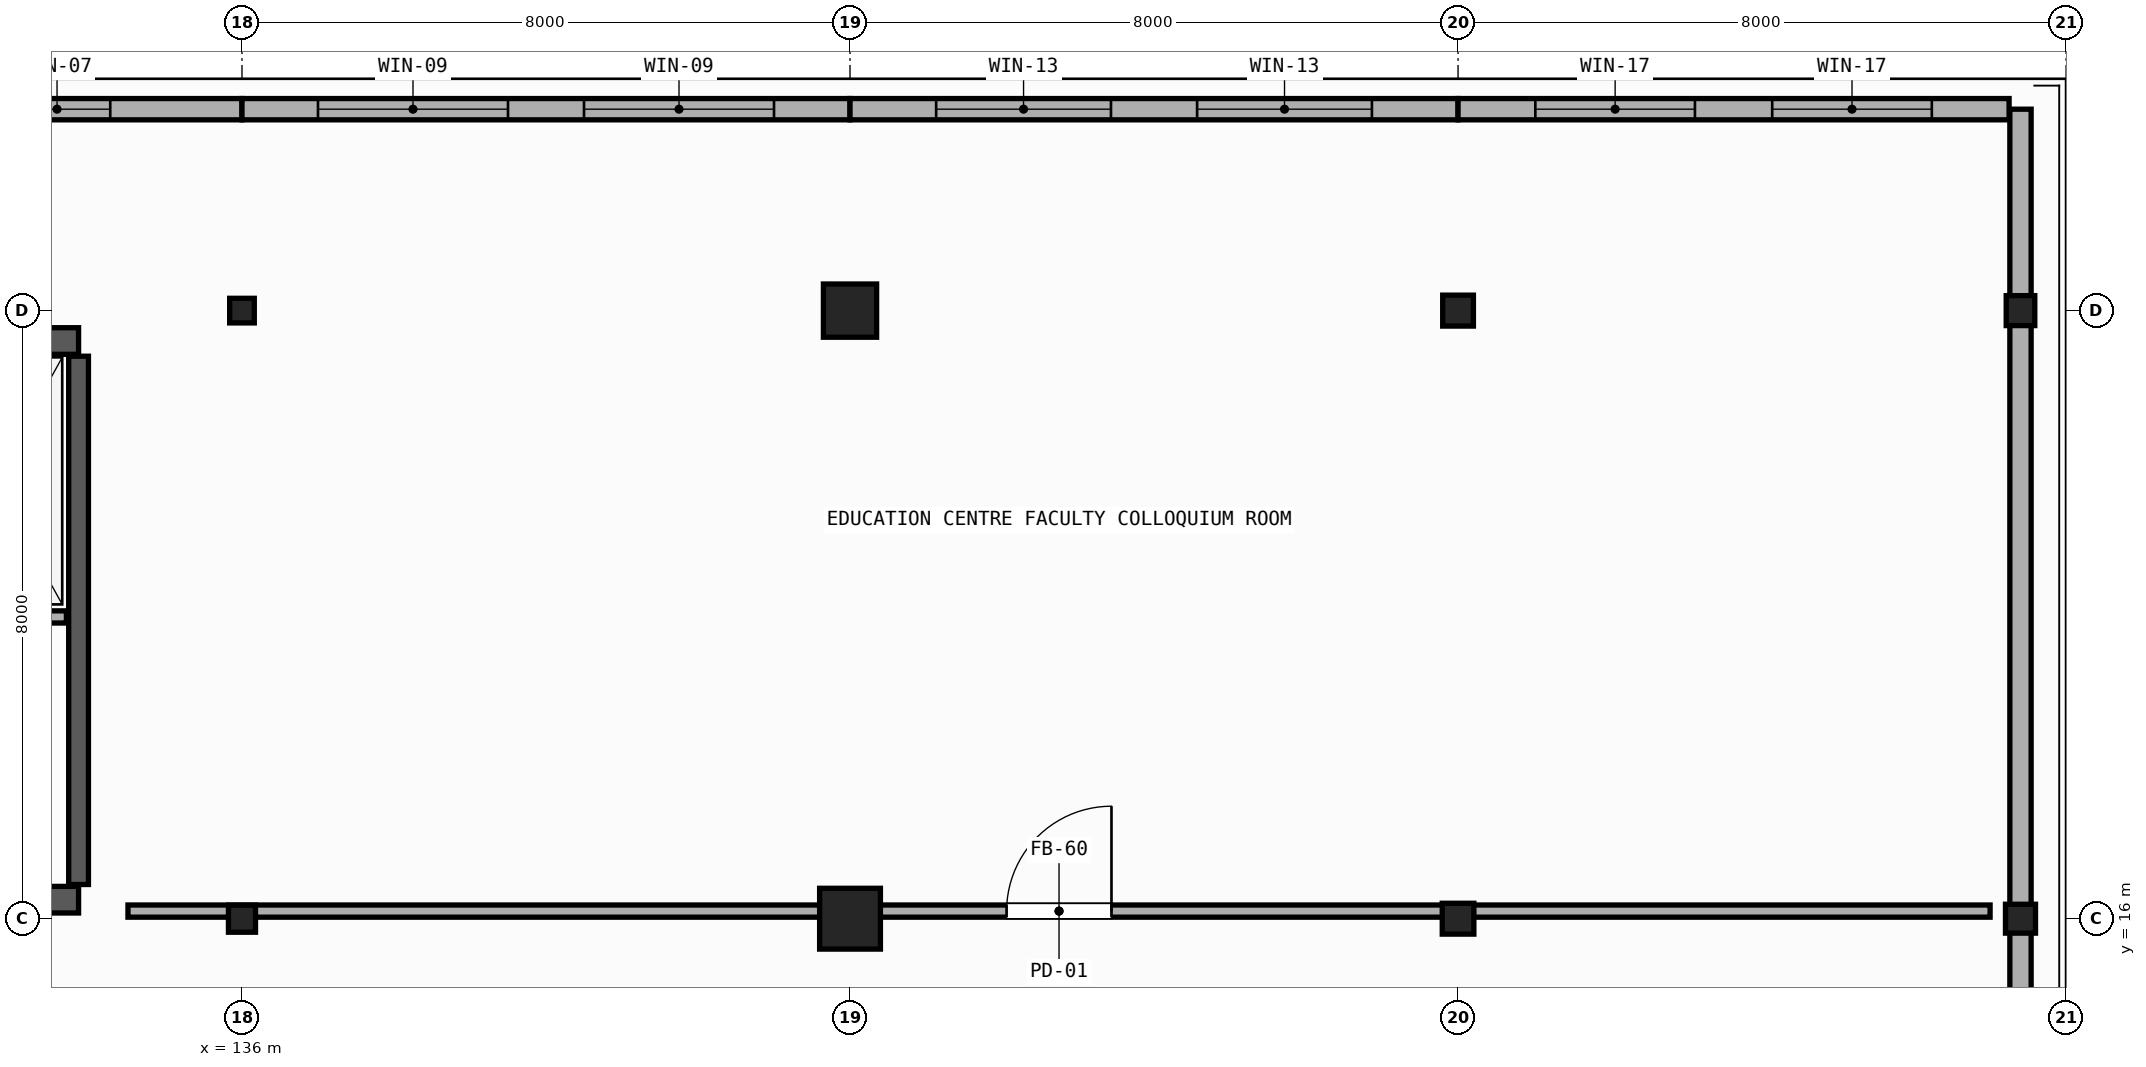
"""IFC4 building model, lengths in metres.
Left out: names, types, materials, properties, quantities, classifications, styles, units other than length and angle.
Written with IfcOpenShell. Run it as: python <this file> out.ifc"""

import sys

from ifc_helpers import new_model, si_unit, direction, frame, frame_2d, origin, origin_2d, place, context, subcontext, project, spatial, rectangle, hollow_circle, i_section, extrude, element, fill, save


model = new_model("IFC4")
c1 = context("Model", 3, precision=1e-05, world=origin(), true_north=direction((0.0, 1.0)))
c2 = subcontext(c1, "Body", "Model", "MODEL_VIEW")
j1 = project(units=[si_unit("LENGTHUNIT", "METRE"), si_unit("PLANEANGLEUNIT", "RADIAN")], contexts=[c1])
p1 = place(None, origin())
s1 = spatial("IfcSite", under=j1, at=p1, CompositionType="ELEMENT")
p2 = place(p1, origin())
s2 = spatial("IfcBuilding", under=s1, at=p2, CompositionType="ELEMENT")
p3 = place(p2, frame((0.0, 0.0, 10.2)))
s3 = spatial("IfcBuildingStorey", under=s2, at=p3, CompositionType="ELEMENT", Elevation=10.2)
p4 = place(p3, frame((136.0, 16.0, 0.0), z_axis=(0.0, 0.0, 1.0), x_axis=(0.0, 1.0, 0.0)))
e1 = element("IfcColumn", 1, at=p4, inside=s3, PredefinedType="COLUMN", context=c2, shape_type="SweptSolid", body=[
    extrude(hollow_circle(Radius=0.178, WallThickness=0.012, at=origin_2d()), origin(), (0.0, 0.0, 1.0), 4.58),
])
p5 = place(p3, frame((136.0, 24.0, 0.0), z_axis=(0.0, 0.0, 1.0), x_axis=(1.0, 0.0, 0.0)))
e2 = element("IfcColumn", 2, at=p5, inside=s3, PredefinedType="COLUMN", context=c2, shape_type="SweptSolid", body=[
    extrude(hollow_circle(Radius=0.162, WallThickness=0.012, at=origin_2d()), origin(), (0.0, 0.0, 1.0), 4.58),
])
p6 = place(p3, frame((144.0, 16.0, 0.0), z_axis=(0.0, 0.0, 1.0), x_axis=(1.0, 0.0, 0.0)))
e3 = element("IfcColumn", 3, at=p6, inside=s3, PredefinedType="COLUMN", context=c2, shape_type="SweptSolid", body=[
    extrude(rectangle(XDim=0.8, YDim=0.8, at=origin_2d()), origin(), (0.0, 0.0, 1.0), 4.58),
])
p7 = place(p3, frame((144.0, 24.0, 0.0), z_axis=(0.0, 0.0, 1.0), x_axis=(0.0, 1.0, 0.0)))
e4 = element("IfcColumn", 4, at=p7, inside=s3, PredefinedType="COLUMN", context=c2, shape_type="SweptSolid", body=[
    extrude(rectangle(XDim=0.7, YDim=0.7, at=origin_2d()), origin(), (0.0, 0.0, 1.0), 4.58),
])
p8 = place(p3, frame((152.0, 16.0, 0.0), z_axis=(0.0, 0.0, 1.0), x_axis=(0.0, 1.0, 0.0)))
e5 = element("IfcColumn", 5, at=p8, inside=s3, PredefinedType="COLUMN", context=c2, shape_type="SweptSolid", body=[
    extrude(i_section(OverallWidth=0.406, OverallDepth=0.416, WebThickness=0.03, FlangeThickness=0.048, FilletRadius=0.015, at=origin_2d()), origin(), (0.0, 0.0, 1.0), 4.58),
])
p9 = place(p3, frame((152.0, 24.0, 0.0), z_axis=(0.0, 0.0, 1.0), x_axis=(1.0, 0.0, 0.0)))
e6 = element("IfcColumn", 6, at=p9, inside=s3, PredefinedType="COLUMN", context=c2, shape_type="SweptSolid", body=[
    extrude(i_section(OverallWidth=0.404, OverallDepth=0.407, WebThickness=0.027, FlangeThickness=0.044, FilletRadius=0.015, at=origin_2d()), origin(), (0.0, 0.0, 1.0), 4.58),
])
p10 = place(p3, frame((159.4, 16.0, 0.0), z_axis=(0.0, 0.0, 1.0), x_axis=(1.0, 0.0, 0.0)))
e7 = element("IfcColumn", 7, at=p10, inside=s3, PredefinedType="COLUMN", context=c2, shape_type="SweptSolid", body=[
    extrude(i_section(OverallWidth=0.395, OverallDepth=0.38, WebThickness=0.019, FlangeThickness=0.03, FilletRadius=0.015, at=origin_2d()), origin(), (0.0, 0.0, 1.0), 4.58),
])
p11 = place(p3, frame((159.4, 24.0, 0.0), z_axis=(0.0, 0.0, 1.0), x_axis=(0.0, 1.0, 0.0)))
e8 = element("IfcColumn", 8, at=p11, inside=s3, PredefinedType="COLUMN", context=c2, shape_type="SweptSolid", body=[
    extrude(i_section(OverallWidth=0.394, OverallDepth=0.376, WebThickness=0.017, FlangeThickness=0.028, FilletRadius=0.015, at=origin_2d()), origin(), (0.0, 0.0, 1.0), 4.58),
])
p12 = place(p3, frame((128.0, 26.65, 0.0), z_axis=(0.0, 0.0, 1.0), x_axis=(1.0, 0.0, 0.0)))
e9 = element("IfcWall", 9, at=p12, inside=s3, PredefinedType="STANDARD", context=c2, shape_type="SweptSolid", body=[
    extrude(rectangle(XDim=8.0, YDim=0.28, at=frame_2d((4.0, 0.0))), origin(), (0.0, 0.0, 1.0), 4.4),
])
p13 = place(p12, frame((1.733, 0.0, 0.95)))
e10 = element("IfcOpeningElement", 10, at=p13, cuts=e9, PredefinedType="OPENING", context=c2, shape_type="SweptSolid", body=[
    extrude(rectangle(XDim=1.4, YDim=2.1, at=frame_2d((0.7, 1.05))), frame((0.0, 0.15, 0.0), z_axis=(0.0, -1.0, 0.0), x_axis=(1.0, 0.0, 0.0)), (0.0, 0.0, 1.0), 0.3),
])
p14 = place(p12, frame((4.867, 0.0, 0.95)))
e11 = element("IfcOpeningElement", 11, at=p14, cuts=e9, PredefinedType="OPENING", context=c2, shape_type="SweptSolid", body=[
    extrude(rectangle(XDim=1.4, YDim=2.1, at=frame_2d((0.7, 1.05))), frame((0.0, 0.15, 0.0), z_axis=(0.0, -1.0, 0.0), x_axis=(1.0, 0.0, 0.0)), (0.0, 0.0, 1.0), 0.3),
])
p15 = place(p3, frame((136.0, 26.65, 0.0), z_axis=(0.0, 0.0, 1.0), x_axis=(1.0, 0.0, 0.0)))
e12 = element("IfcWall", 12, at=p15, inside=s3, PredefinedType="STANDARD", context=c2, shape_type="SweptSolid", body=[
    extrude(rectangle(XDim=8.0, YDim=0.28, at=frame_2d((4.0, 0.0))), origin(), (0.0, 0.0, 1.0), 4.4),
])
p16 = place(p15, frame((1.0, 0.0, 1.0)))
e13 = element("IfcOpeningElement", 13, at=p16, cuts=e12, PredefinedType="OPENING", context=c2, shape_type="SweptSolid", body=[
    extrude(rectangle(XDim=2.5, YDim=2.1, at=frame_2d((1.25, 1.05))), frame((0.0, 0.15, 0.0), z_axis=(0.0, -1.0, 0.0), x_axis=(1.0, 0.0, 0.0)), (0.0, 0.0, 1.0), 0.3),
])
p17 = place(p15, frame((4.5, 0.0, 1.0)))
e14 = element("IfcOpeningElement", 14, at=p17, cuts=e12, PredefinedType="OPENING", context=c2, shape_type="SweptSolid", body=[
    extrude(rectangle(XDim=2.5, YDim=2.1, at=frame_2d((1.25, 1.05))), frame((0.0, 0.15, 0.0), z_axis=(0.0, -1.0, 0.0), x_axis=(1.0, 0.0, 0.0)), (0.0, 0.0, 1.0), 0.3),
])
p18 = place(p3, frame((144.0, 26.65, 0.0), z_axis=(0.0, 0.0, 1.0), x_axis=(1.0, 0.0, 0.0)))
e15 = element("IfcWall", 15, at=p18, inside=s3, PredefinedType="STANDARD", context=c2, shape_type="SweptSolid", body=[
    extrude(rectangle(XDim=8.0, YDim=0.28, at=frame_2d((4.0, 0.0))), origin(), (0.0, 0.0, 1.0), 4.4),
])
p19 = place(p18, frame((1.133, 0.0, 2.25)))
e16 = element("IfcOpeningElement", 16, at=p19, cuts=e15, PredefinedType="OPENING", context=c2, shape_type="SweptSolid", body=[
    extrude(rectangle(XDim=2.3, YDim=1.2, at=frame_2d((1.15, 0.6))), frame((0.0, 0.15, 0.0), z_axis=(0.0, -1.0, 0.0), x_axis=(1.0, 0.0, 0.0)), (0.0, 0.0, 1.0), 0.3),
])
p20 = place(p18, frame((4.567, 0.0, 2.25)))
e17 = element("IfcOpeningElement", 17, at=p20, cuts=e15, PredefinedType="OPENING", context=c2, shape_type="SweptSolid", body=[
    extrude(rectangle(XDim=2.3, YDim=1.2, at=frame_2d((1.15, 0.6))), frame((0.0, 0.15, 0.0), z_axis=(0.0, -1.0, 0.0), x_axis=(1.0, 0.0, 0.0)), (0.0, 0.0, 1.0), 0.3),
])
p21 = place(p3, frame((152.0, 26.65, 0.0), z_axis=(0.0, 0.0, 1.0), x_axis=(1.0, 0.0, 0.0)))
e18 = element("IfcWall", 18, at=p21, inside=s3, PredefinedType="STANDARD", context=c2, shape_type="SweptSolid", body=[
    extrude(rectangle(XDim=7.25, YDim=0.28, at=frame_2d((3.625, 0.0))), origin(), (0.0, 0.0, 1.0), 4.4),
])
p22 = place(p21, frame((1.017, 0.0, 0.85)))
e19 = element("IfcOpeningElement", 19, at=p22, cuts=e18, PredefinedType="OPENING", context=c2, shape_type="SweptSolid", body=[
    extrude(rectangle(XDim=2.1, YDim=2.65, at=frame_2d((1.05, 1.325))), frame((0.0, 0.15, 0.0), z_axis=(0.0, -1.0, 0.0), x_axis=(1.0, 0.0, 0.0)), (0.0, 0.0, 1.0), 0.3),
])
p23 = place(p21, frame((4.133, 0.0, 0.85)))
e20 = element("IfcOpeningElement", 20, at=p23, cuts=e18, PredefinedType="OPENING", context=c2, shape_type="SweptSolid", body=[
    extrude(rectangle(XDim=2.1, YDim=2.65, at=frame_2d((1.05, 1.325))), frame((0.0, 0.15, 0.0), z_axis=(0.0, -1.0, 0.0), x_axis=(1.0, 0.0, 0.0)), (0.0, 0.0, 1.0), 0.3),
])
p24 = place(p3, frame((159.4, 8.0, 0.0), z_axis=(0.0, 0.0, 1.0), x_axis=(0.0, 1.0, 0.0)))
e21 = element("IfcWall", 21, at=p24, inside=s3, PredefinedType="STANDARD", context=c2, shape_type="SweptSolid", body=[
    extrude(rectangle(XDim=8.0, YDim=0.28, at=frame_2d((4.0, 0.0))), origin(), (0.0, 0.0, 1.0), 3.74),
])
p25 = place(p24, frame((1.6, 0.0, 1.05)))
e22 = element("IfcOpeningElement", 22, at=p25, cuts=e21, PredefinedType="OPENING", context=c2, shape_type="SweptSolid", body=[
    extrude(rectangle(XDim=1.6, YDim=1.75, at=frame_2d((0.8, 0.875))), frame((0.0, 0.15, 0.0), z_axis=(0.0, -1.0, 0.0), x_axis=(1.0, 0.0, 0.0)), (0.0, 0.0, 1.0), 0.3),
])
p26 = place(p24, frame((4.8, 0.0, 1.05)))
e23 = element("IfcOpeningElement", 23, at=p26, cuts=e21, PredefinedType="OPENING", context=c2, shape_type="SweptSolid", body=[
    extrude(rectangle(XDim=1.6, YDim=1.75, at=frame_2d((0.8, 0.875))), frame((0.0, 0.15, 0.0), z_axis=(0.0, -1.0, 0.0), x_axis=(1.0, 0.0, 0.0)), (0.0, 0.0, 1.0), 0.3),
])
p27 = place(p3, frame((159.4, 16.0, 0.0), z_axis=(0.0, 0.0, 1.0), x_axis=(0.0, 1.0, 0.0)))
e24 = element("IfcWall", 24, at=p27, inside=s3, PredefinedType="STANDARD", context=c2, shape_type="SweptSolid", body=[
    extrude(rectangle(XDim=8.0, YDim=0.28, at=frame_2d((4.0, 0.0))), origin(), (0.0, 0.0, 1.0), 3.74),
])
p28 = place(p3, frame((159.4, 24.0, 0.0), z_axis=(0.0, 0.0, 1.0), x_axis=(0.0, 1.0, 0.0)))
e25 = element("IfcWall", 25, at=p28, inside=s3, PredefinedType="STANDARD", context=c2, shape_type="SweptSolid", body=[
    extrude(rectangle(XDim=2.65, YDim=0.28, at=frame_2d((1.325, 0.0))), origin(), (0.0, 0.0, 1.0), 3.862),
])
p29 = place(p3, frame((128.0, 16.25, 0.0), z_axis=(0.0, 0.0, 1.0), x_axis=(1.0, 0.0, 0.0)))
e26 = element("IfcWall", 26, at=p29, inside=s3, PredefinedType="SHEAR", context=c2, shape_type="SweptSolid", body=[
    extrude(rectangle(XDim=5.85, YDim=0.35, at=frame_2d((2.925, 0.0))), origin(), (0.0, 0.0, 1.0), 4.57),
])
p30 = place(p29, frame((1.4, 0.0, 0.0)))
e27 = element("IfcOpeningElement", 27, at=p30, cuts=e26, PredefinedType="OPENING", context=c2, shape_type="SweptSolid", body=[
    extrude(rectangle(XDim=1.05, YDim=2.1, at=frame_2d((0.525, 1.05))), frame((0.0, 0.185, 0.0), z_axis=(0.0, -1.0, 0.0), x_axis=(1.0, 0.0, 0.0)), (0.0, 0.0, 1.0), 0.37),
])
p31 = place(p29, frame((4.25, 0.0, 0.0)))
e28 = element("IfcOpeningElement", 28, at=p31, cuts=e26, PredefinedType="OPENING", context=c2, shape_type="SweptSolid", body=[
    extrude(rectangle(XDim=1.0, YDim=2.15, at=frame_2d((0.5, 1.075))), frame((0.0, 0.185, 0.0), z_axis=(0.0, -1.0, 0.0), x_axis=(1.0, 0.0, 0.0)), (0.0, 0.0, 1.0), 0.37),
])
p32 = place(p3, frame((128.0, 23.6, 0.0), z_axis=(0.0, 0.0, 1.0), x_axis=(1.0, 0.0, 0.0)))
e29 = element("IfcWall", 29, at=p32, inside=s3, PredefinedType="SHEAR", context=c2, shape_type="SweptSolid", body=[
    extrude(rectangle(XDim=5.85, YDim=0.35, at=frame_2d((2.925, 0.0))), origin(), (0.0, 0.0, 1.0), 4.57),
])
p33 = place(p3, frame((133.85, 16.45, 0.0), z_axis=(0.0, 0.0, 1.0), x_axis=(0.0, 1.0, 0.0)))
e30 = element("IfcWall", 30, at=p33, inside=s3, PredefinedType="SHEAR", context=c2, shape_type="SweptSolid", body=[
    extrude(rectangle(XDim=6.95, YDim=0.26, at=frame_2d((3.475, 0.0))), origin(), (0.0, 0.0, 1.0), 4.57),
])
p34 = place(p3, frame((131.85, 19.97, 0.0), z_axis=(0.0, 0.0, 1.0), x_axis=(1.0, 0.0, 0.0)))
e31 = element("IfcWall", 31, at=p34, inside=s3, PredefinedType="PARTITIONING", context=c2, shape_type="SweptSolid", body=[
    extrude(rectangle(XDim=1.84, YDim=0.16, at=frame_2d((0.92, 0.0))), origin(), (0.0, 0.0, 1.0), 3.6),
])
p35 = place(p34, frame((0.37, 0.0, 0.0)))
e32 = element("IfcOpeningElement", 32, at=p35, cuts=e31, PredefinedType="OPENING", context=c2, shape_type="SweptSolid", body=[
    extrude(rectangle(XDim=1.1, YDim=2.15, at=frame_2d((0.55, 1.075))), frame((0.0, 0.09, 0.0), z_axis=(0.0, -1.0, 0.0), x_axis=(1.0, 0.0, 0.0)), (0.0, 0.0, 1.0), 0.18),
])
p36 = place(p3, frame((134.5, 16.1, 0.0), z_axis=(0.0, 0.0, 1.0), x_axis=(1.0, 0.0, 0.0)))
e33 = element("IfcWall", 33, at=p36, inside=s3, PredefinedType="PARTITIONING", context=c2, shape_type="SweptSolid", body=[
    extrude(rectangle(XDim=24.5, YDim=0.16, at=frame_2d((12.25, 0.0))), origin(), (0.0, 0.0, 1.0), 3.778),
])
p37 = place(p36, frame((11.56, 0.0, 0.0)))
e34 = element("IfcOpeningElement", 34, at=p37, cuts=e33, PredefinedType="OPENING", context=c2, shape_type="SweptSolid", body=[
    extrude(rectangle(XDim=1.38, YDim=2.25, at=frame_2d((0.69, 1.125))), frame((0.0, 0.09, 0.0), z_axis=(0.0, -1.0, 0.0), x_axis=(1.0, 0.0, 0.0)), (0.0, 0.0, 1.0), 0.18),
])
p38 = place(p14, origin())
e35 = element("IfcWindow", 35, at=p38, inside=s3, PartitioningType="SINGLE_PANEL", PredefinedType="WINDOW", context=c2, shape_type="SweptSolid", body=[
    extrude(rectangle(XDim=1.4, YDim=2.1, at=frame_2d((0.7, 1.05))), frame((0.0, 0.03, 0.0), z_axis=(0.0, -1.0, 0.0), x_axis=(1.0, 0.0, 0.0)), (0.0, 0.0, 1.0), 0.06),
])
fill(e11, e35)
p39 = place(p16, origin())
e36 = element("IfcWindow", 36, at=p39, inside=s3, PartitioningType="SINGLE_PANEL", PredefinedType="WINDOW", context=c2, shape_type="SweptSolid", body=[
    extrude(rectangle(XDim=2.5, YDim=2.1, at=frame_2d((1.25, 1.05))), frame((0.0, 0.03, 0.0), z_axis=(0.0, -1.0, 0.0), x_axis=(1.0, 0.0, 0.0)), (0.0, 0.0, 1.0), 0.06),
])
fill(e13, e36)
p40 = place(p17, origin())
e37 = element("IfcWindow", 37, at=p40, inside=s3, PartitioningType="SINGLE_PANEL", PredefinedType="WINDOW", context=c2, shape_type="SweptSolid", body=[
    extrude(rectangle(XDim=2.5, YDim=2.1, at=frame_2d((1.25, 1.05))), frame((0.0, 0.03, 0.0), z_axis=(0.0, -1.0, 0.0), x_axis=(1.0, 0.0, 0.0)), (0.0, 0.0, 1.0), 0.06),
])
fill(e14, e37)
p41 = place(p19, origin())
e38 = element("IfcWindow", 38, at=p41, inside=s3, PartitioningType="SINGLE_PANEL", PredefinedType="WINDOW", context=c2, shape_type="SweptSolid", body=[
    extrude(rectangle(XDim=2.3, YDim=1.2, at=frame_2d((1.15, 0.6))), frame((0.0, 0.03, 0.0), z_axis=(0.0, -1.0, 0.0), x_axis=(1.0, 0.0, 0.0)), (0.0, 0.0, 1.0), 0.06),
])
fill(e16, e38)
p42 = place(p20, origin())
e39 = element("IfcWindow", 39, at=p42, inside=s3, PartitioningType="SINGLE_PANEL", PredefinedType="WINDOW", context=c2, shape_type="SweptSolid", body=[
    extrude(rectangle(XDim=2.3, YDim=1.2, at=frame_2d((1.15, 0.6))), frame((0.0, 0.03, 0.0), z_axis=(0.0, -1.0, 0.0), x_axis=(1.0, 0.0, 0.0)), (0.0, 0.0, 1.0), 0.06),
])
fill(e17, e39)
p43 = place(p22, origin())
e40 = element("IfcWindow", 40, at=p43, inside=s3, PartitioningType="SINGLE_PANEL", PredefinedType="WINDOW", context=c2, shape_type="SweptSolid", body=[
    extrude(rectangle(XDim=2.1, YDim=2.65, at=frame_2d((1.05, 1.325))), frame((0.0, 0.03, 0.0), z_axis=(0.0, -1.0, 0.0), x_axis=(1.0, 0.0, 0.0)), (0.0, 0.0, 1.0), 0.06),
])
fill(e19, e40)
p44 = place(p23, origin())
e41 = element("IfcWindow", 41, at=p44, inside=s3, PartitioningType="SINGLE_PANEL", PredefinedType="WINDOW", context=c2, shape_type="SweptSolid", body=[
    extrude(rectangle(XDim=2.1, YDim=2.65, at=frame_2d((1.05, 1.325))), frame((0.0, 0.03, 0.0), z_axis=(0.0, -1.0, 0.0), x_axis=(1.0, 0.0, 0.0)), (0.0, 0.0, 1.0), 0.06),
])
fill(e20, e41)
p45 = place(p37, origin())
e42 = element("IfcDoor", 42, at=p45, inside=s3, OperationType="SINGLE_SWING_RIGHT", PredefinedType="DOOR", context=c2, shape_type="SweptSolid", body=[
    extrude(rectangle(XDim=1.38, YDim=2.25, at=frame_2d((0.69, 1.125))), frame((0.0, 0.025, 0.0), z_axis=(0.0, -1.0, 0.0), x_axis=(1.0, 0.0, 0.0)), (0.0, 0.0, 1.0), 0.05),
])
fill(e34, e42)
save(model, sys.argv[1])
